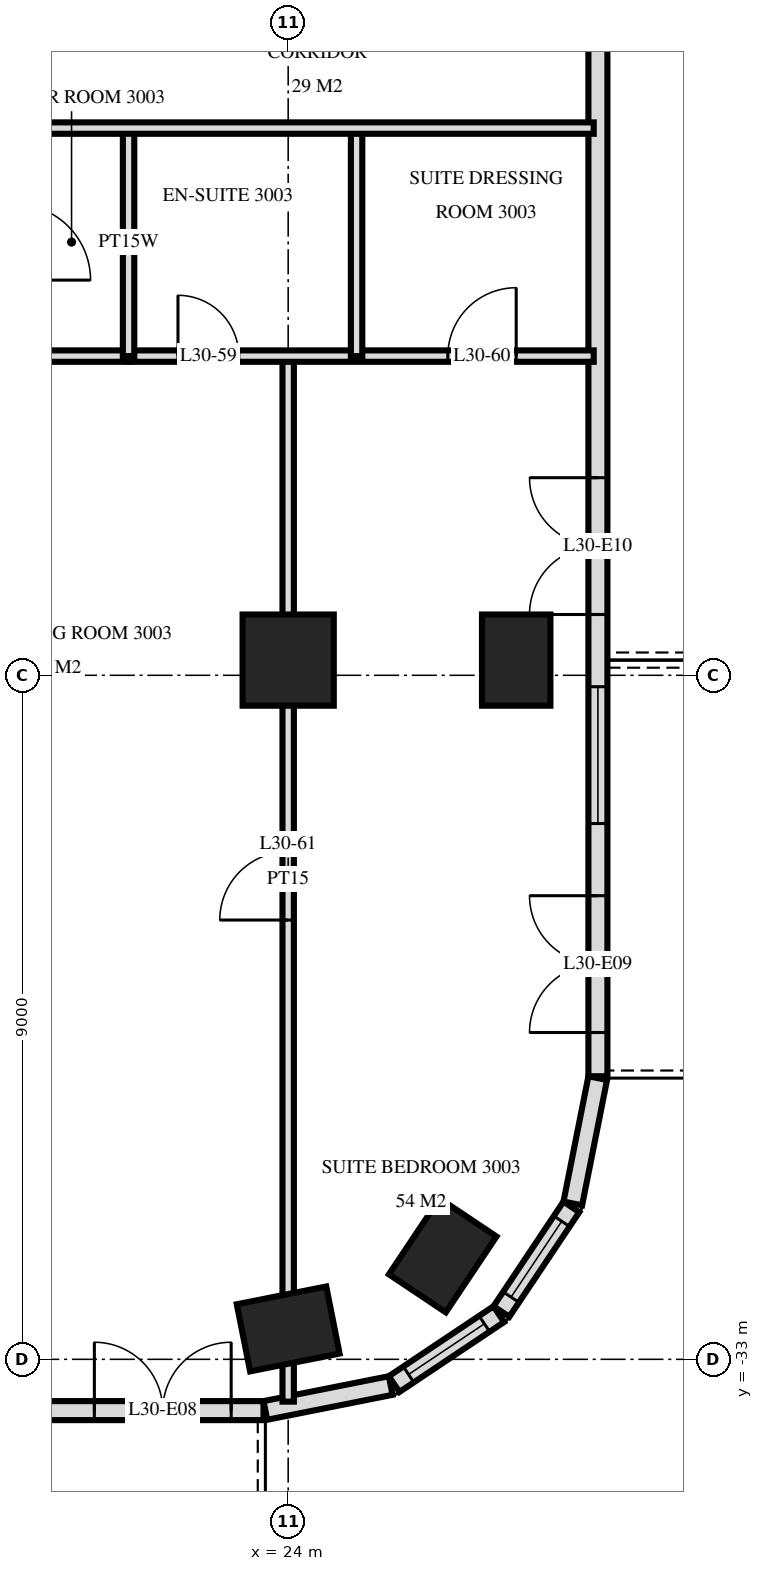
"""IFC4 building model, lengths in metres.
Left out: names, types, materials, properties, quantities, classifications, styles, units other than length and angle.
Written with IfcOpenShell. Run it as: python <this file> out.ifc"""

import sys

from ifc_helpers import new_model, si_unit, direction, frame, frame_2d, origin, origin_2d, place, context, subcontext, project, spatial, rectangle, extrude, element, fill, save


model = new_model("IFC4")
c1 = context("Model", 3, precision=1e-05, world=origin(), true_north=direction((0.0, 1.0)))
c2 = subcontext(c1, "Body", "Model", "MODEL_VIEW")
j1 = project(units=[si_unit("LENGTHUNIT", "METRE"), si_unit("PLANEANGLEUNIT", "RADIAN")], contexts=[c1])
p1 = place(None, origin())
s1 = spatial("IfcSite", under=j1, at=p1, CompositionType="ELEMENT")
p2 = place(p1, origin())
s2 = spatial("IfcBuilding", under=s1, at=p2, CompositionType="ELEMENT")
p3 = place(p2, frame((0.0, 0.0, 120.0)))
s3 = spatial("IfcBuildingStorey", under=s2, at=p3, CompositionType="ELEMENT", Elevation=120.0)
p4 = place(p3, frame((24.0, -32.6, 0.0), z_axis=(0.0, 0.0, 1.0), x_axis=(0.980792089743, 0.195056086032, 0.0)))
e1 = element("IfcColumn", 1, at=p4, inside=s3, PredefinedType="COLUMN", context=c2, shape_type="SweptSolid", body=[
    extrude(rectangle(XDim=1.2, YDim=0.9, at=origin_2d()), origin(), (0.0, 0.0, 1.0), 3.6),
])
p5 = place(p3, frame((24.0, -23.8, 0.0), z_axis=(0.0, 0.0, 1.0), x_axis=(1.0, 0.0, 0.0)))
e2 = element("IfcColumn", 2, at=p5, inside=s3, PredefinedType="COLUMN", context=c2, shape_type="SweptSolid", body=[
    extrude(rectangle(XDim=1.2, YDim=1.2, at=origin_2d()), origin(), (0.0, 0.0, 1.0), 3.6),
])
for number, where, z_axis, x_axis in (
    (3, (26.033, -31.633, 0.0), (0.0, 0.0, 1.0), (0.556, 0.831, 0.0)),
    (4, (27.0, -23.8, 0.0), (0.0, 0.0, 1.0), (0.0, 1.0, 0.0)),
):
    element("IfcColumn", number, at=place(p3, frame(where, z_axis=z_axis, x_axis=x_axis)), inside=s3, PredefinedType="COLUMN", context=c2, shape_type="SweptSolid", body=[
        extrude(rectangle(XDim=1.2, YDim=0.9, at=origin_2d()), origin(), (0.0, 0.0, 1.0), 3.6),
    ])
p6 = place(p3, frame((-23.675, -33.675, 0.0), z_axis=(0.0, 0.0, 1.0), x_axis=(1.0, 0.0, 0.0)))
e5 = element("IfcWall", 5, at=p6, inside=s3, PredefinedType="SOLIDWALL", context=c2, shape_type="SweptSolid", body=[
    extrude(rectangle(XDim=47.351, YDim=0.25, at=frame_2d((23.675, 0.0))), origin(), (0.0, 0.0, 1.0), 3.32),
])
p7 = place(p6, frame((0.275, 0.0, 0.3)))
e6 = element("IfcOpeningElement", 6, at=p7, cuts=e5, PredefinedType="OPENING", context=c2, shape_type="SweptSolid", body=[
    extrude(rectangle(XDim=2.4, YDim=2.1, at=frame_2d((1.2, 1.05))), frame((0.0, 0.135, 0.0), z_axis=(0.0, -1.0, 0.0), x_axis=(1.0, 0.0, 0.0)), (0.0, 0.0, 1.0), 0.27),
])
p8 = place(p6, frame((3.425, 0.0, 0.0)))
e7 = element("IfcOpeningElement", 7, at=p8, cuts=e5, PredefinedType="OPENING", context=c2, shape_type="SweptSolid", body=[
    extrude(rectangle(XDim=1.8, YDim=2.4, at=frame_2d((0.9, 1.2))), frame((0.0, 0.135, 0.0), z_axis=(0.0, -1.0, 0.0), x_axis=(1.0, 0.0, 0.0)), (0.0, 0.0, 1.0), 0.27),
])
p9 = place(p6, frame((7.775, 0.0, 0.0)))
e8 = element("IfcOpeningElement", 8, at=p9, cuts=e5, PredefinedType="OPENING", context=c2, shape_type="SweptSolid", body=[
    extrude(rectangle(XDim=1.8, YDim=2.4, at=frame_2d((0.9, 1.2))), frame((0.0, 0.135, 0.0), z_axis=(0.0, -1.0, 0.0), x_axis=(1.0, 0.0, 0.0)), (0.0, 0.0, 1.0), 0.27),
])
p10 = place(p6, frame((12.275, 0.0, 0.0)))
e9 = element("IfcOpeningElement", 9, at=p10, cuts=e5, PredefinedType="OPENING", context=c2, shape_type="SweptSolid", body=[
    extrude(rectangle(XDim=1.8, YDim=2.4, at=frame_2d((0.9, 1.2))), frame((0.0, 0.135, 0.0), z_axis=(0.0, -1.0, 0.0), x_axis=(1.0, 0.0, 0.0)), (0.0, 0.0, 1.0), 0.27),
])
p11 = place(p6, frame((14.975, 0.0, 0.3)))
e10 = element("IfcOpeningElement", 10, at=p11, cuts=e5, PredefinedType="OPENING", context=c2, shape_type="SweptSolid", body=[
    extrude(rectangle(XDim=2.4, YDim=2.1, at=frame_2d((1.2, 1.05))), frame((0.0, 0.135, 0.0), z_axis=(0.0, -1.0, 0.0), x_axis=(1.0, 0.0, 0.0)), (0.0, 0.0, 1.0), 0.27),
])
p12 = place(p6, frame((17.975, 0.0, 0.3)))
e11 = element("IfcOpeningElement", 11, at=p12, cuts=e5, PredefinedType="OPENING", context=c2, shape_type="SweptSolid", body=[
    extrude(rectangle(XDim=2.4, YDim=2.1, at=frame_2d((1.2, 1.05))), frame((0.0, 0.135, 0.0), z_axis=(0.0, -1.0, 0.0), x_axis=(1.0, 0.0, 0.0)), (0.0, 0.0, 1.0), 0.27),
])
p13 = place(p6, frame((21.275, 0.0, 0.0)))
e12 = element("IfcOpeningElement", 12, at=p13, cuts=e5, PredefinedType="OPENING", context=c2, shape_type="SweptSolid", body=[
    extrude(rectangle(XDim=1.8, YDim=2.4, at=frame_2d((0.9, 1.2))), frame((0.0, 0.135, 0.0), z_axis=(0.0, -1.0, 0.0), x_axis=(1.0, 0.0, 0.0)), (0.0, 0.0, 1.0), 0.27),
])
p14 = place(p6, frame((24.275, 0.0, 0.0)))
e13 = element("IfcOpeningElement", 13, at=p14, cuts=e5, PredefinedType="OPENING", context=c2, shape_type="SweptSolid", body=[
    extrude(rectangle(XDim=1.8, YDim=2.4, at=frame_2d((0.9, 1.2))), frame((0.0, 0.135, 0.0), z_axis=(0.0, -1.0, 0.0), x_axis=(1.0, 0.0, 0.0)), (0.0, 0.0, 1.0), 0.27),
])
p15 = place(p6, frame((26.975, 0.0, 0.3)))
e14 = element("IfcOpeningElement", 14, at=p15, cuts=e5, PredefinedType="OPENING", context=c2, shape_type="SweptSolid", body=[
    extrude(rectangle(XDim=2.4, YDim=2.1, at=frame_2d((1.2, 1.05))), frame((0.0, 0.135, 0.0), z_axis=(0.0, -1.0, 0.0), x_axis=(1.0, 0.0, 0.0)), (0.0, 0.0, 1.0), 0.27),
])
p16 = place(p6, frame((30.275, 0.0, 0.0)))
e15 = element("IfcOpeningElement", 15, at=p16, cuts=e5, PredefinedType="OPENING", context=c2, shape_type="SweptSolid", body=[
    extrude(rectangle(XDim=1.8, YDim=2.4, at=frame_2d((0.9, 1.2))), frame((0.0, 0.135, 0.0), z_axis=(0.0, -1.0, 0.0), x_axis=(1.0, 0.0, 0.0)), (0.0, 0.0, 1.0), 0.27),
])
p17 = place(p6, frame((32.975, 0.0, 0.3)))
e16 = element("IfcOpeningElement", 16, at=p17, cuts=e5, PredefinedType="OPENING", context=c2, shape_type="SweptSolid", body=[
    extrude(rectangle(XDim=2.4, YDim=2.1, at=frame_2d((1.2, 1.05))), frame((0.0, 0.135, 0.0), z_axis=(0.0, -1.0, 0.0), x_axis=(1.0, 0.0, 0.0)), (0.0, 0.0, 1.0), 0.27),
])
p18 = place(p6, frame((35.975, 0.0, 0.3)))
e17 = element("IfcOpeningElement", 17, at=p18, cuts=e5, PredefinedType="OPENING", context=c2, shape_type="SweptSolid", body=[
    extrude(rectangle(XDim=2.4, YDim=2.1, at=frame_2d((1.2, 1.05))), frame((0.0, 0.135, 0.0), z_axis=(0.0, -1.0, 0.0), x_axis=(1.0, 0.0, 0.0)), (0.0, 0.0, 1.0), 0.27),
])
p19 = place(p6, frame((39.275, 0.0, 0.0)))
e18 = element("IfcOpeningElement", 18, at=p19, cuts=e5, PredefinedType="OPENING", context=c2, shape_type="SweptSolid", body=[
    extrude(rectangle(XDim=1.8, YDim=2.4, at=frame_2d((0.9, 1.2))), frame((0.0, 0.135, 0.0), z_axis=(0.0, -1.0, 0.0), x_axis=(1.0, 0.0, 0.0)), (0.0, 0.0, 1.0), 0.27),
])
p20 = place(p6, frame((41.975, 0.0, 0.3)))
e19 = element("IfcOpeningElement", 19, at=p20, cuts=e5, PredefinedType="OPENING", context=c2, shape_type="SweptSolid", body=[
    extrude(rectangle(XDim=2.4, YDim=2.1, at=frame_2d((1.2, 1.05))), frame((0.0, 0.135, 0.0), z_axis=(0.0, -1.0, 0.0), x_axis=(1.0, 0.0, 0.0)), (0.0, 0.0, 1.0), 0.27),
])
p21 = place(p6, frame((45.125, 0.0, 0.0)))
e20 = element("IfcOpeningElement", 20, at=p21, cuts=e5, PredefinedType="OPENING", context=c2, shape_type="SweptSolid", body=[
    extrude(rectangle(XDim=1.8, YDim=2.4, at=frame_2d((0.9, 1.2))), frame((0.0, 0.135, 0.0), z_axis=(0.0, -1.0, 0.0), x_axis=(1.0, 0.0, 0.0)), (0.0, 0.0, 1.0), 0.27),
])
p22 = place(p3, frame((23.7, -33.673, 0.0), z_axis=(0.0, 0.0, 1.0), x_axis=(0.980775640221, 0.19513878023, 0.0)))
e21 = element("IfcWall", 21, at=p22, inside=s3, PredefinedType="SOLIDWALL", context=c2, shape_type="SweptSolid", body=[
    extrude(rectangle(XDim=1.681, YDim=0.25, at=frame_2d((0.841, 0.0))), origin(), (0.0, 0.0, 1.0), 3.32),
])
p23 = place(p3, frame((25.394, -33.326, 0.0), z_axis=(0.0, 0.0, 1.0), x_axis=(0.831482937015, 0.55555029066, 0.0)))
e22 = element("IfcWall", 22, at=p23, inside=s3, PredefinedType="SOLIDWALL", context=c2, shape_type="SweptSolid", body=[
    extrude(rectangle(XDim=1.656, YDim=0.25, at=frame_2d((0.828, 0.0))), origin(), (0.0, 0.0, 1.0), 3.32),
])
p24 = place(p23, frame((0.228, 0.0, 0.9)))
e23 = element("IfcOpeningElement", 23, at=p24, cuts=e22, PredefinedType="OPENING", context=c2, shape_type="SweptSolid", body=[
    extrude(rectangle(XDim=1.2, YDim=1.5, at=frame_2d((0.6, 0.75))), frame((0.0, 0.135, 0.0), z_axis=(0.0, -1.0, 0.0), x_axis=(1.0, 0.0, 0.0)), (0.0, 0.0, 1.0), 0.27),
])
p25 = place(p3, frame((26.806, -32.371, 0.0), z_axis=(0.0, 0.0, 1.0), x_axis=(0.55555029066, 0.831482937015, 0.0)))
e24 = element("IfcWall", 24, at=p25, inside=s3, PredefinedType="SOLIDWALL", context=c2, shape_type="SweptSolid", body=[
    extrude(rectangle(XDim=1.656, YDim=0.25, at=frame_2d((0.828, 0.0))), origin(), (0.0, 0.0, 1.0), 3.32),
])
p26 = place(p25, frame((0.228, 0.0, 0.9)))
e25 = element("IfcOpeningElement", 25, at=p26, cuts=e24, PredefinedType="OPENING", context=c2, shape_type="SweptSolid", body=[
    extrude(rectangle(XDim=1.2, YDim=1.5, at=frame_2d((0.6, 0.75))), frame((0.0, 0.135, 0.0), z_axis=(0.0, -1.0, 0.0), x_axis=(1.0, 0.0, 0.0)), (0.0, 0.0, 1.0), 0.27),
])
p27 = place(p3, frame((27.745, -30.949, 0.0), z_axis=(0.0, 0.0, 1.0), x_axis=(0.194999110559, 0.980803419081, 0.0)))
e26 = element("IfcWall", 26, at=p27, inside=s3, PredefinedType="SOLIDWALL", context=c2, shape_type="SweptSolid", body=[
    extrude(rectangle(XDim=1.681, YDim=0.25, at=frame_2d((0.841, 0.0))), origin(), (0.0, 0.0, 1.0), 3.32),
])
p28 = place(p3, frame((28.075, -29.275, 0.0), z_axis=(0.0, 0.0, 1.0), x_axis=(0.0, 1.0, 0.0)))
e27 = element("IfcWall", 27, at=p28, inside=s3, PredefinedType="SOLIDWALL", context=c2, shape_type="SweptSolid", body=[
    extrude(rectangle(XDim=25.951, YDim=0.25, at=frame_2d((12.975, 0.0))), origin(), (0.0, 0.0, 1.0), 3.32),
])
p29 = place(p28, frame((0.575, 0.0, 0.0)))
e28 = element("IfcOpeningElement", 28, at=p29, cuts=e27, PredefinedType="OPENING", context=c2, shape_type="SweptSolid", body=[
    extrude(rectangle(XDim=1.8, YDim=2.4, at=frame_2d((0.9, 1.2))), frame((0.0, 0.135, 0.0), z_axis=(0.0, -1.0, 0.0), x_axis=(1.0, 0.0, 0.0)), (0.0, 0.0, 1.0), 0.27),
])
p30 = place(p28, frame((3.325, 0.0, 0.3)))
e29 = element("IfcOpeningElement", 29, at=p30, cuts=e27, PredefinedType="OPENING", context=c2, shape_type="SweptSolid", body=[
    extrude(rectangle(XDim=1.8, YDim=2.1, at=frame_2d((0.9, 1.05))), frame((0.0, 0.135, 0.0), z_axis=(0.0, -1.0, 0.0), x_axis=(1.0, 0.0, 0.0)), (0.0, 0.0, 1.0), 0.27),
])
p31 = place(p28, frame((6.075, 0.0, 0.0)))
e30 = element("IfcOpeningElement", 30, at=p31, cuts=e27, PredefinedType="OPENING", context=c2, shape_type="SweptSolid", body=[
    extrude(rectangle(XDim=1.8, YDim=2.4, at=frame_2d((0.9, 1.2))), frame((0.0, 0.135, 0.0), z_axis=(0.0, -1.0, 0.0), x_axis=(1.0, 0.0, 0.0)), (0.0, 0.0, 1.0), 0.27),
])
p32 = place(p28, frame((17.125, 0.0, 0.0)))
e31 = element("IfcOpeningElement", 31, at=p32, cuts=e27, PredefinedType="OPENING", context=c2, shape_type="SweptSolid", body=[
    extrude(rectangle(XDim=1.8, YDim=2.4, at=frame_2d((0.9, 1.2))), frame((0.0, 0.135, 0.0), z_axis=(0.0, -1.0, 0.0), x_axis=(1.0, 0.0, 0.0)), (0.0, 0.0, 1.0), 0.27),
])
p33 = place(p3, frame((24.9, -19.8, 0.0), z_axis=(0.0, 0.0, 1.0), x_axis=(0.0, 1.0, 0.0)))
e32 = element("IfcWall", 32, at=p33, inside=s3, PredefinedType="PARTITIONING", context=c2, shape_type="SweptSolid", body=[
    extrude(rectangle(XDim=3.0, YDim=0.15, at=frame_2d((1.5, 0.0))), origin(), (0.0, 0.0, 1.0), 3.32),
])
p34 = place(p3, frame((24.0, -33.557, 0.0), z_axis=(0.0, 0.0, 1.0), x_axis=(0.0, 1.0, 0.0)))
e33 = element("IfcWall", 33, at=p34, inside=s3, PredefinedType="PARTITIONING", context=c2, shape_type="SweptSolid", body=[
    extrude(rectangle(XDim=13.757, YDim=0.15, at=frame_2d((6.878, 0.0))), origin(), (0.0, 0.0, 1.0), 3.32),
])
p35 = place(p34, frame((6.337, 0.0, 0.0)))
e34 = element("IfcOpeningElement", 34, at=p35, cuts=e33, PredefinedType="OPENING", context=c2, shape_type="SweptSolid", body=[
    extrude(rectangle(XDim=0.9, YDim=2.1, at=frame_2d((0.45, 1.05))), frame((0.0, 0.085, 0.0), z_axis=(0.0, -1.0, 0.0), x_axis=(1.0, 0.0, 0.0)), (0.0, 0.0, 1.0), 0.17),
])
p36 = place(p3, frame((21.9, -19.8, 0.0), z_axis=(0.0, 0.0, 1.0), x_axis=(0.0, 1.0, 0.0)))
e35 = element("IfcWall", 35, at=p36, inside=s3, PredefinedType="PLUMBINGWALL", context=c2, shape_type="SweptSolid", body=[
    extrude(rectangle(XDim=3.0, YDim=0.15, at=frame_2d((1.5, 0.0))), origin(), (0.0, 0.0, 1.0), 3.32),
])
p37 = place(p3, frame((21.9, -19.8, 0.0), z_axis=(0.0, 0.0, 1.0), x_axis=(1.0, 0.0, 0.0)))
e36 = element("IfcWall", 36, at=p37, inside=s3, PredefinedType="PARTITIONING", context=c2, shape_type="SweptSolid", body=[
    extrude(rectangle(XDim=6.12, YDim=0.15, at=frame_2d((3.06, 0.0))), origin(), (0.0, 0.0, 1.0), 3.32),
])
p38 = place(p37, frame((0.65, 0.0, 0.0)))
e37 = element("IfcOpeningElement", 37, at=p38, cuts=e36, PredefinedType="OPENING", context=c2, shape_type="SweptSolid", body=[
    extrude(rectangle(XDim=0.8, YDim=2.1, at=frame_2d((0.4, 1.05))), frame((0.0, 0.085, 0.0), z_axis=(0.0, -1.0, 0.0), x_axis=(1.0, 0.0, 0.0)), (0.0, 0.0, 1.0), 0.17),
])
p39 = place(p37, frame((4.2, 0.0, 0.0)))
e38 = element("IfcOpeningElement", 38, at=p39, cuts=e36, PredefinedType="OPENING", context=c2, shape_type="SweptSolid", body=[
    extrude(rectangle(XDim=0.9, YDim=2.1, at=frame_2d((0.45, 1.05))), frame((0.0, 0.085, 0.0), z_axis=(0.0, -1.0, 0.0), x_axis=(1.0, 0.0, 0.0)), (0.0, 0.0, 1.0), 0.17),
])
p40 = place(p3, frame((20.4, -19.8, 0.0), z_axis=(0.0, 0.0, 1.0), x_axis=(1.0, 0.0, 0.0)))
e39 = element("IfcWall", 39, at=p40, inside=s3, PredefinedType="PLUMBINGWALL", context=c2, shape_type="SweptSolid", body=[
    extrude(rectangle(XDim=1.5, YDim=0.15, at=frame_2d((0.75, 0.0))), origin(), (0.0, 0.0, 1.0), 3.32),
])
p41 = place(p3, frame((-28.02, -16.8, 0.0), z_axis=(0.0, 0.0, 1.0), x_axis=(1.0, 0.0, 0.0)))
e40 = element("IfcWall", 40, at=p41, inside=s3, PredefinedType="PARTITIONING", context=c2, shape_type="SweptSolid", body=[
    extrude(rectangle(XDim=56.04, YDim=0.15, at=frame_2d((28.02, 0.0))), origin(), (0.0, 0.0, 1.0), 3.32),
])
p42 = place(p41, frame((12.52, 0.0, 0.0)))
e41 = element("IfcOpeningElement", 41, at=p42, cuts=e40, PredefinedType="OPENING", context=c2, shape_type="SweptSolid", body=[
    extrude(rectangle(XDim=1.0, YDim=2.1, at=frame_2d((0.5, 1.05))), frame((0.0, 0.085, 0.0), z_axis=(0.0, -1.0, 0.0), x_axis=(1.0, 0.0, 0.0)), (0.0, 0.0, 1.0), 0.17),
])
p43 = place(p41, frame((8.32, 0.0, 0.0)))
e42 = element("IfcOpeningElement", 42, at=p43, cuts=e40, PredefinedType="OPENING", context=c2, shape_type="SweptSolid", body=[
    extrude(rectangle(XDim=1.0, YDim=2.1, at=frame_2d((0.5, 1.05))), frame((0.0, 0.085, 0.0), z_axis=(0.0, -1.0, 0.0), x_axis=(1.0, 0.0, 0.0)), (0.0, 0.0, 1.0), 0.17),
])
p44 = place(p41, frame((40.42, 0.0, 0.0)))
e43 = element("IfcOpeningElement", 43, at=p44, cuts=e40, PredefinedType="OPENING", context=c2, shape_type="SweptSolid", body=[
    extrude(rectangle(XDim=1.0, YDim=2.1, at=frame_2d((0.5, 1.05))), frame((0.0, 0.085, 0.0), z_axis=(0.0, -1.0, 0.0), x_axis=(1.0, 0.0, 0.0)), (0.0, 0.0, 1.0), 0.17),
])
p45 = place(p41, frame((46.72, 0.0, 0.0)))
e44 = element("IfcOpeningElement", 44, at=p45, cuts=e40, PredefinedType="OPENING", context=c2, shape_type="SweptSolid", body=[
    extrude(rectangle(XDim=1.0, YDim=2.1, at=frame_2d((0.5, 1.05))), frame((0.0, 0.085, 0.0), z_axis=(0.0, -1.0, 0.0), x_axis=(1.0, 0.0, 0.0)), (0.0, 0.0, 1.0), 0.17),
])
p46 = place(p41, frame((21.52, 0.0, 0.0)))
e45 = element("IfcOpeningElement", 45, at=p46, cuts=e40, PredefinedType="OPENING", context=c2, shape_type="SweptSolid", body=[
    extrude(rectangle(XDim=1.0, YDim=2.1, at=frame_2d((0.5, 1.05))), frame((0.0, 0.085, 0.0), z_axis=(0.0, -1.0, 0.0), x_axis=(1.0, 0.0, 0.0)), (0.0, 0.0, 1.0), 0.17),
])
p47 = place(p41, frame((30.52, 0.0, 0.0)))
e46 = element("IfcOpeningElement", 46, at=p47, cuts=e40, PredefinedType="OPENING", context=c2, shape_type="SweptSolid", body=[
    extrude(rectangle(XDim=1.0, YDim=2.1, at=frame_2d((0.5, 1.05))), frame((0.0, 0.085, 0.0), z_axis=(0.0, -1.0, 0.0), x_axis=(1.0, 0.0, 0.0)), (0.0, 0.0, 1.0), 0.17),
])
p48 = place(p41, frame((36.52, 0.0, 0.0)))
e47 = element("IfcOpeningElement", 47, at=p48, cuts=e40, PredefinedType="OPENING", context=c2, shape_type="SweptSolid", body=[
    extrude(rectangle(XDim=1.0, YDim=2.1, at=frame_2d((0.5, 1.05))), frame((0.0, 0.085, 0.0), z_axis=(0.0, -1.0, 0.0), x_axis=(1.0, 0.0, 0.0)), (0.0, 0.0, 1.0), 0.17),
])
p49 = place(p24, origin())
e48 = element("IfcWindow", 48, at=p49, inside=s3, PartitioningType="SINGLE_PANEL", PredefinedType="WINDOW", context=c2, shape_type="SweptSolid", body=[
    extrude(rectangle(XDim=1.2, YDim=1.5, at=frame_2d((0.6, 0.75))), frame((0.0, 0.03, 0.0), z_axis=(0.0, -1.0, 0.0), x_axis=(1.0, 0.0, 0.0)), (0.0, 0.0, 1.0), 0.06),
])
fill(e23, e48)
p50 = place(p26, origin())
e49 = element("IfcWindow", 49, at=p50, inside=s3, PartitioningType="SINGLE_PANEL", PredefinedType="WINDOW", context=c2, shape_type="SweptSolid", body=[
    extrude(rectangle(XDim=1.2, YDim=1.5, at=frame_2d((0.6, 0.75))), frame((0.0, 0.03, 0.0), z_axis=(0.0, -1.0, 0.0), x_axis=(1.0, 0.0, 0.0)), (0.0, 0.0, 1.0), 0.06),
])
fill(e25, e49)
p51 = place(p21, origin())
e50 = element("IfcDoor", 50, at=p51, inside=s3, OperationType="DOUBLE_DOOR_SINGLE_SWING", PredefinedType="DOOR", context=c2, shape_type="SweptSolid", body=[
    extrude(rectangle(XDim=1.8, YDim=2.4, at=frame_2d((0.9, 1.2))), frame((0.0, 0.025, 0.0), z_axis=(0.0, -1.0, 0.0), x_axis=(1.0, 0.0, 0.0)), (0.0, 0.0, 1.0), 0.05),
])
fill(e20, e50)
p52 = place(p29, origin())
e51 = element("IfcDoor", 51, at=p52, inside=s3, OperationType="DOUBLE_DOOR_SINGLE_SWING", PredefinedType="DOOR", context=c2, shape_type="SweptSolid", body=[
    extrude(rectangle(XDim=1.8, YDim=2.4, at=frame_2d((0.9, 1.2))), frame((0.0, 0.025, 0.0), z_axis=(0.0, -1.0, 0.0), x_axis=(1.0, 0.0, 0.0)), (0.0, 0.0, 1.0), 0.05),
])
fill(e28, e51)
p53 = place(p30, origin())
e52 = element("IfcWindow", 52, at=p53, inside=s3, PartitioningType="SINGLE_PANEL", PredefinedType="WINDOW", context=c2, shape_type="SweptSolid", body=[
    extrude(rectangle(XDim=1.8, YDim=2.1, at=frame_2d((0.9, 1.05))), frame((0.0, 0.03, 0.0), z_axis=(0.0, -1.0, 0.0), x_axis=(1.0, 0.0, 0.0)), (0.0, 0.0, 1.0), 0.06),
])
fill(e29, e52)
p54 = place(p31, origin())
e53 = element("IfcDoor", 53, at=p54, inside=s3, OperationType="DOUBLE_DOOR_SINGLE_SWING", PredefinedType="DOOR", context=c2, shape_type="SweptSolid", body=[
    extrude(rectangle(XDim=1.8, YDim=2.4, at=frame_2d((0.9, 1.2))), frame((0.0, 0.025, 0.0), z_axis=(0.0, -1.0, 0.0), x_axis=(1.0, 0.0, 0.0)), (0.0, 0.0, 1.0), 0.05),
])
fill(e30, e53)
p55 = place(p38, origin())
e54 = element("IfcDoor", 54, at=p55, inside=s3, OperationType="SINGLE_SWING_RIGHT", PredefinedType="DOOR", context=c2, shape_type="SweptSolid", body=[
    extrude(rectangle(XDim=0.8, YDim=2.1, at=frame_2d((0.4, 1.05))), frame((0.0, 0.025, 0.0), z_axis=(0.0, -1.0, 0.0), x_axis=(1.0, 0.0, 0.0)), (0.0, 0.0, 1.0), 0.05),
])
fill(e37, e54)
p56 = place(p39, origin())
e55 = element("IfcDoor", 55, at=p56, inside=s3, OperationType="SINGLE_SWING_LEFT", PredefinedType="DOOR", context=c2, shape_type="SweptSolid", body=[
    extrude(rectangle(XDim=0.9, YDim=2.1, at=frame_2d((0.45, 1.05))), frame((0.0, 0.025, 0.0), z_axis=(0.0, -1.0, 0.0), x_axis=(1.0, 0.0, 0.0)), (0.0, 0.0, 1.0), 0.05),
])
fill(e38, e55)
p57 = place(p35, origin())
e56 = element("IfcDoor", 56, at=p57, inside=s3, OperationType="SINGLE_SWING_RIGHT", PredefinedType="DOOR", context=c2, shape_type="SweptSolid", body=[
    extrude(rectangle(XDim=0.9, YDim=2.1, at=frame_2d((0.45, 1.05))), frame((0.0, 0.025, 0.0), z_axis=(0.0, -1.0, 0.0), x_axis=(1.0, 0.0, 0.0)), (0.0, 0.0, 1.0), 0.05),
])
fill(e34, e56)
save(model, sys.argv[1])
